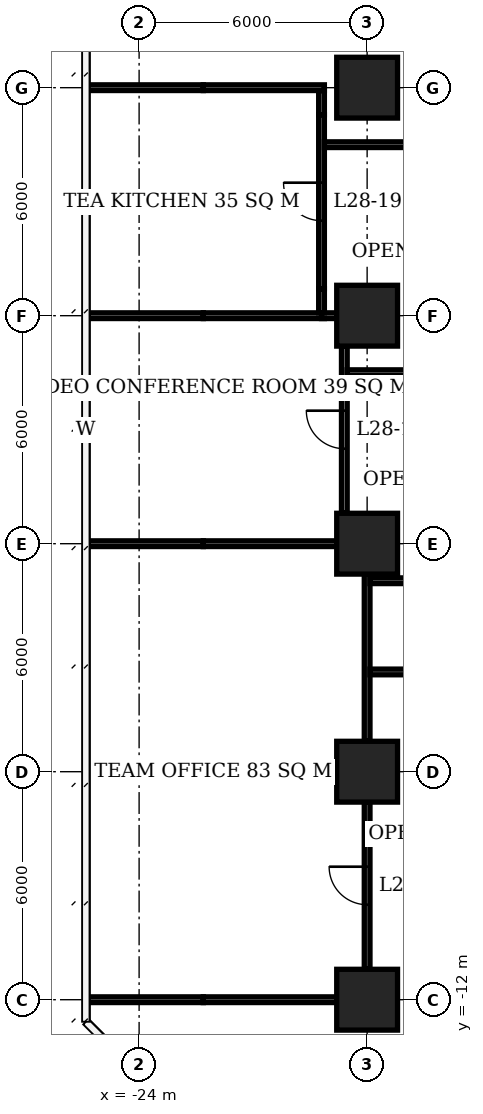
"""IFC4 building model, lengths in metres.
Left out: names, types, materials, properties, quantities, classifications, styles, units other than length and angle.
Written with IfcOpenShell. Run it as: python <this file> out.ifc"""

import sys

from ifc_helpers import new_model, si_unit, direction, frame, frame_2d, origin, origin_2d, place, context, subcontext, project, spatial, rectangle, extrude, element, fill, save


model = new_model("IFC4")
c1 = context("Model", 3, precision=1e-05, world=origin(), true_north=direction((0.0, 1.0)))
c2 = subcontext(c1, "Body", "Model", "MODEL_VIEW")
j1 = project(units=[si_unit("LENGTHUNIT", "METRE"), si_unit("PLANEANGLEUNIT", "RADIAN")], contexts=[c1])
p1 = place(None, origin())
s1 = spatial("IfcSite", under=j1, at=p1, CompositionType="ELEMENT")
p2 = place(p1, origin())
s2 = spatial("IfcBuilding", under=s1, at=p2, CompositionType="ELEMENT")
p3 = place(p2, frame((0.0, 0.0, 117.2)))
s3 = spatial("IfcBuildingStorey", under=s2, at=p3, CompositionType="ELEMENT", Elevation=117.2)
for number, where, z_axis, x_axis in (
    (1, (-18.0, -12.0, 0.0), (0.0, 0.0, 1.0), (1.0, 0.0, 0.0)),
    (2, (-18.0, -6.0, 0.0), (0.0, 0.0, 1.0), (1.0, 0.0, 0.0)),
    (3, (-18.0, 0.0, 0.0), (0.0, 0.0, 1.0), (1.0, 0.0, 0.0)),
    (4, (-18.0, 6.0, 0.0), (0.0, 0.0, 1.0), (1.0, 0.0, 0.0)),
    (5, (-18.0, 12.0, 0.0), (0.0, 0.0, 1.0), (1.0, 0.0, 0.0)),
):
    element("IfcColumn", number, at=place(p3, frame(where, z_axis=z_axis, x_axis=x_axis)), inside=s3, PredefinedType="COLUMN", context=c2, shape_type="SweptSolid", body=[
        extrude(rectangle(XDim=1.6, YDim=1.6, at=origin_2d()), origin(), (0.0, 0.0, 1.0), 3.9),
    ])
p4 = place(p3, frame((-25.4, -12.0, 0.0), z_axis=(0.0, 0.0, 1.0), x_axis=(1.0, 0.0, 0.0)))
e6 = element("IfcWall", 6, at=p4, inside=s3, PredefinedType="PARTITIONING", context=c2, shape_type="SweptSolid", body=[
    extrude(rectangle(XDim=3.09, YDim=0.15, at=frame_2d((1.545, 0.0))), origin(), (0.0, 0.0, 1.0), 3.65),
])
p5 = place(p3, frame((-22.31, -12.0, 0.0), z_axis=(0.0, 0.0, 1.0), x_axis=(1.0, 0.0, 0.0)))
e7 = element("IfcWall", 7, at=p5, inside=s3, PredefinedType="PARTITIONING", context=c2, shape_type="SweptSolid", body=[
    extrude(rectangle(XDim=3.51, YDim=0.15, at=frame_2d((1.755, 0.0))), origin(), (0.0, 0.0, 1.0), 2.65),
])
p6 = place(p3, frame((-25.35, 0.0, 0.0), z_axis=(0.0, 0.0, 1.0), x_axis=(1.0, 0.0, 0.0)))
e8 = element("IfcWall", 8, at=p6, inside=s3, PredefinedType="PARTITIONING", context=c2, shape_type="SweptSolid", body=[
    extrude(rectangle(XDim=3.04, YDim=0.15, at=frame_2d((1.52, 0.0))), origin(), (0.0, 0.0, 1.0), 3.65),
])
p7 = place(p3, frame((-22.31, 0.0, 0.0), z_axis=(0.0, 0.0, 1.0), x_axis=(1.0, 0.0, 0.0)))
e9 = element("IfcWall", 9, at=p7, inside=s3, PredefinedType="PARTITIONING", context=c2, shape_type="SweptSolid", body=[
    extrude(rectangle(XDim=3.51, YDim=0.15, at=frame_2d((1.755, 0.0))), origin(), (0.0, 0.0, 1.0), 2.65),
])
p8 = place(p3, frame((-25.35, 6.0, 0.0), z_axis=(0.0, 0.0, 1.0), x_axis=(1.0, 0.0, 0.0)))
e10 = element("IfcWall", 10, at=p8, inside=s3, PredefinedType="PARTITIONING", context=c2, shape_type="SweptSolid", body=[
    extrude(rectangle(XDim=3.04, YDim=0.15, at=frame_2d((1.52, 0.0))), origin(), (0.0, 0.0, 1.0), 3.65),
])
p9 = place(p3, frame((-22.31, 6.0, 0.0), z_axis=(0.0, 0.0, 1.0), x_axis=(1.0, 0.0, 0.0)))
e11 = element("IfcWall", 11, at=p9, inside=s3, PredefinedType="PARTITIONING", context=c2, shape_type="SweptSolid", body=[
    extrude(rectangle(XDim=3.185, YDim=0.15, at=frame_2d((1.593, 0.0))), origin(), (0.0, 0.0, 1.0), 2.65),
])
p10 = place(p3, frame((-19.2, 6.0, 0.0), z_axis=(0.0, 0.0, 1.0), x_axis=(1.0, 0.0, 0.0)))
e12 = element("IfcWall", 12, at=p10, inside=s3, PredefinedType="PARTITIONING", context=c2, shape_type="SweptSolid", body=[
    extrude(rectangle(XDim=0.4, YDim=0.15, at=frame_2d((0.2, 0.0))), origin(), (0.0, 0.0, 1.0), 2.65),
])
p11 = place(p3, frame((-25.4, 12.0, 0.0), z_axis=(0.0, 0.0, 1.0), x_axis=(1.0, 0.0, 0.0)))
e13 = element("IfcWall", 13, at=p11, inside=s3, PredefinedType="PARTITIONING", context=c2, shape_type="SweptSolid", body=[
    extrude(rectangle(XDim=3.09, YDim=0.15, at=frame_2d((1.545, 0.0))), origin(), (0.0, 0.0, 1.0), 3.65),
])
p12 = place(p3, frame((-22.31, 12.0, 0.0), z_axis=(0.0, 0.0, 1.0), x_axis=(1.0, 0.0, 0.0)))
e14 = element("IfcWall", 14, at=p12, inside=s3, PredefinedType="PARTITIONING", context=c2, shape_type="SweptSolid", body=[
    extrude(rectangle(XDim=3.185, YDim=0.15, at=frame_2d((1.593, 0.0))), origin(), (0.0, 0.0, 1.0), 2.65),
])
p13 = place(p3, frame((-19.2, 6.075, 0.0), z_axis=(0.0, 0.0, 1.0), x_axis=(0.0, 1.0, 0.0)))
e15 = element("IfcWall", 15, at=p13, inside=s3, PredefinedType="PARTITIONING", context=c2, shape_type="SweptSolid", body=[
    extrude(rectangle(XDim=0.635, YDim=0.15, at=frame_2d((0.317, 0.0))), origin(), (0.0, 0.0, 1.0), 2.65),
])
p14 = place(p3, frame((-19.2, 6.71, 0.0), z_axis=(0.0, 0.0, 1.0), x_axis=(0.0, 1.0, 0.0)))
e16 = element("IfcWall", 16, at=p14, inside=s3, PredefinedType="PARTITIONING", context=c2, shape_type="SweptSolid", body=[
    extrude(rectangle(XDim=4.58, YDim=0.15, at=frame_2d((2.29, 0.0))), origin(), (0.0, 0.0, 1.0), 3.65),
])
p15 = place(p14, frame((1.79, 0.0, 0.0)))
e17 = element("IfcOpeningElement", 17, at=p15, cuts=e16, PredefinedType="OPENING", context=c2, shape_type="SweptSolid", body=[
    extrude(rectangle(XDim=1.0, YDim=2.1, at=frame_2d((0.5, 1.05))), frame((0.0, 0.085, 0.0), z_axis=(0.0, -1.0, 0.0), x_axis=(1.0, 0.0, 0.0)), (0.0, 0.0, 1.0), 0.17),
])
p16 = place(p3, frame((-19.2, 11.29, 0.0), z_axis=(0.0, 0.0, 1.0), x_axis=(0.0, 1.0, 0.0)))
e18 = element("IfcWall", 18, at=p16, inside=s3, PredefinedType="PARTITIONING", context=c2, shape_type="SweptSolid", body=[
    extrude(rectangle(XDim=0.635, YDim=0.15, at=frame_2d((0.317, 0.0))), origin(), (0.0, 0.0, 1.0), 2.65),
])
p17 = place(p3, frame((-18.6, 0.8, 0.0), z_axis=(0.0, 0.0, 1.0), x_axis=(0.0, 1.0, 0.0)))
e19 = element("IfcWall", 19, at=p17, inside=s3, PredefinedType="PARTITIONING", context=c2, shape_type="SweptSolid", body=[
    extrude(rectangle(XDim=4.4, YDim=0.15, at=frame_2d((2.2, 0.0))), origin(), (0.0, 0.0, 1.0), 3.65),
])
p18 = place(p17, frame((1.7, 0.0, 0.0)))
e20 = element("IfcOpeningElement", 20, at=p18, cuts=e19, PredefinedType="OPENING", context=c2, shape_type="SweptSolid", body=[
    extrude(rectangle(XDim=1.0, YDim=2.1, at=frame_2d((0.5, 1.05))), frame((0.0, 0.085, 0.0), z_axis=(0.0, -1.0, 0.0), x_axis=(1.0, 0.0, 0.0)), (0.0, 0.0, 1.0), 0.17),
])
p19 = place(p3, frame((-18.0, -11.2, 0.0), z_axis=(0.0, 0.0, 1.0), x_axis=(0.0, 1.0, 0.0)))
e21 = element("IfcWall", 21, at=p19, inside=s3, PredefinedType="PARTITIONING", context=c2, shape_type="SweptSolid", body=[
    extrude(rectangle(XDim=4.4, YDim=0.15, at=frame_2d((2.2, 0.0))), origin(), (0.0, 0.0, 1.0), 3.65),
])
p20 = place(p19, frame((1.7, 0.0, 0.0)))
e22 = element("IfcOpeningElement", 22, at=p20, cuts=e21, PredefinedType="OPENING", context=c2, shape_type="SweptSolid", body=[
    extrude(rectangle(XDim=1.0, YDim=2.1, at=frame_2d((0.5, 1.05))), frame((0.0, 0.085, 0.0), z_axis=(0.0, -1.0, 0.0), x_axis=(1.0, 0.0, 0.0)), (0.0, 0.0, 1.0), 0.17),
])
p21 = place(p3, frame((-18.0, -5.2, 0.0), z_axis=(0.0, 0.0, 1.0), x_axis=(0.0, 1.0, 0.0)))
e23 = element("IfcWall", 23, at=p21, inside=s3, PredefinedType="PARTITIONING", context=c2, shape_type="SweptSolid", body=[
    extrude(rectangle(XDim=4.4, YDim=0.15, at=frame_2d((2.2, 0.0))), origin(), (0.0, 0.0, 1.0), 3.65),
])
p22 = place(p3, frame((-19.125, 10.5, 0.0), z_axis=(0.0, 0.0, 1.0), x_axis=(1.0, 0.0, 0.0)))
e24 = element("IfcWall", 24, at=p22, inside=s3, PredefinedType="PARTITIONING", context=c2, shape_type="SweptSolid", body=[
    extrude(rectangle(XDim=9.475, YDim=0.15, at=frame_2d((4.738, 0.0))), origin(), (0.0, 0.0, 1.0), 3.65),
])
p23 = place(p3, frame((-18.525, 4.5, 0.0), z_axis=(0.0, 0.0, 1.0), x_axis=(1.0, 0.0, 0.0)))
e25 = element("IfcWall", 25, at=p23, inside=s3, PredefinedType="PARTITIONING", context=c2, shape_type="SweptSolid", body=[
    extrude(rectangle(XDim=8.875, YDim=0.15, at=frame_2d((4.438, 0.0))), origin(), (0.0, 0.0, 1.0), 3.65),
])
for number, where, z_axis, x_axis in (
    (26, (-17.925, -3.375, 0.0), (0.0, 0.0, 1.0), (1.0, 0.0, 0.0)),
    (27, (-17.925, -0.975, 0.0), (0.0, 0.0, 1.0), (1.0, 0.0, 0.0)),
):
    element("IfcWall", number, at=place(p3, frame(where, z_axis=z_axis, x_axis=x_axis)), inside=s3, PredefinedType="PARTITIONING", context=c2, shape_type="SweptSolid", body=[
        extrude(rectangle(XDim=8.2, YDim=0.15, at=frame_2d((4.1, 0.0))), origin(), (0.0, 0.0, 1.0), 3.65),
    ])
p24 = place(p20, origin())
e28 = element("IfcDoor", 28, at=p24, inside=s3, OperationType="SINGLE_SWING_RIGHT", PredefinedType="DOOR", context=c2, shape_type="SweptSolid", body=[
    extrude(rectangle(XDim=1.0, YDim=2.1, at=frame_2d((0.5, 1.05))), frame((0.0, 0.025, 0.0), z_axis=(0.0, -1.0, 0.0), x_axis=(1.0, 0.0, 0.0)), (0.0, 0.0, 1.0), 0.05),
])
fill(e22, e28)
p25 = place(p18, origin())
e29 = element("IfcDoor", 29, at=p25, inside=s3, OperationType="SINGLE_SWING_RIGHT", PredefinedType="DOOR", context=c2, shape_type="SweptSolid", body=[
    extrude(rectangle(XDim=1.0, YDim=2.1, at=frame_2d((0.5, 1.05))), frame((0.0, 0.025, 0.0), z_axis=(0.0, -1.0, 0.0), x_axis=(1.0, 0.0, 0.0)), (0.0, 0.0, 1.0), 0.05),
])
fill(e20, e29)
p26 = place(p15, origin())
e30 = element("IfcDoor", 30, at=p26, inside=s3, OperationType="SINGLE_SWING_RIGHT", PredefinedType="DOOR", context=c2, shape_type="SweptSolid", body=[
    extrude(rectangle(XDim=1.0, YDim=2.1, at=frame_2d((0.5, 1.05))), frame((0.0, 0.025, 0.0), z_axis=(0.0, -1.0, 0.0), x_axis=(1.0, 0.0, 0.0)), (0.0, 0.0, 1.0), 0.05),
])
fill(e17, e30)
save(model, sys.argv[1])
